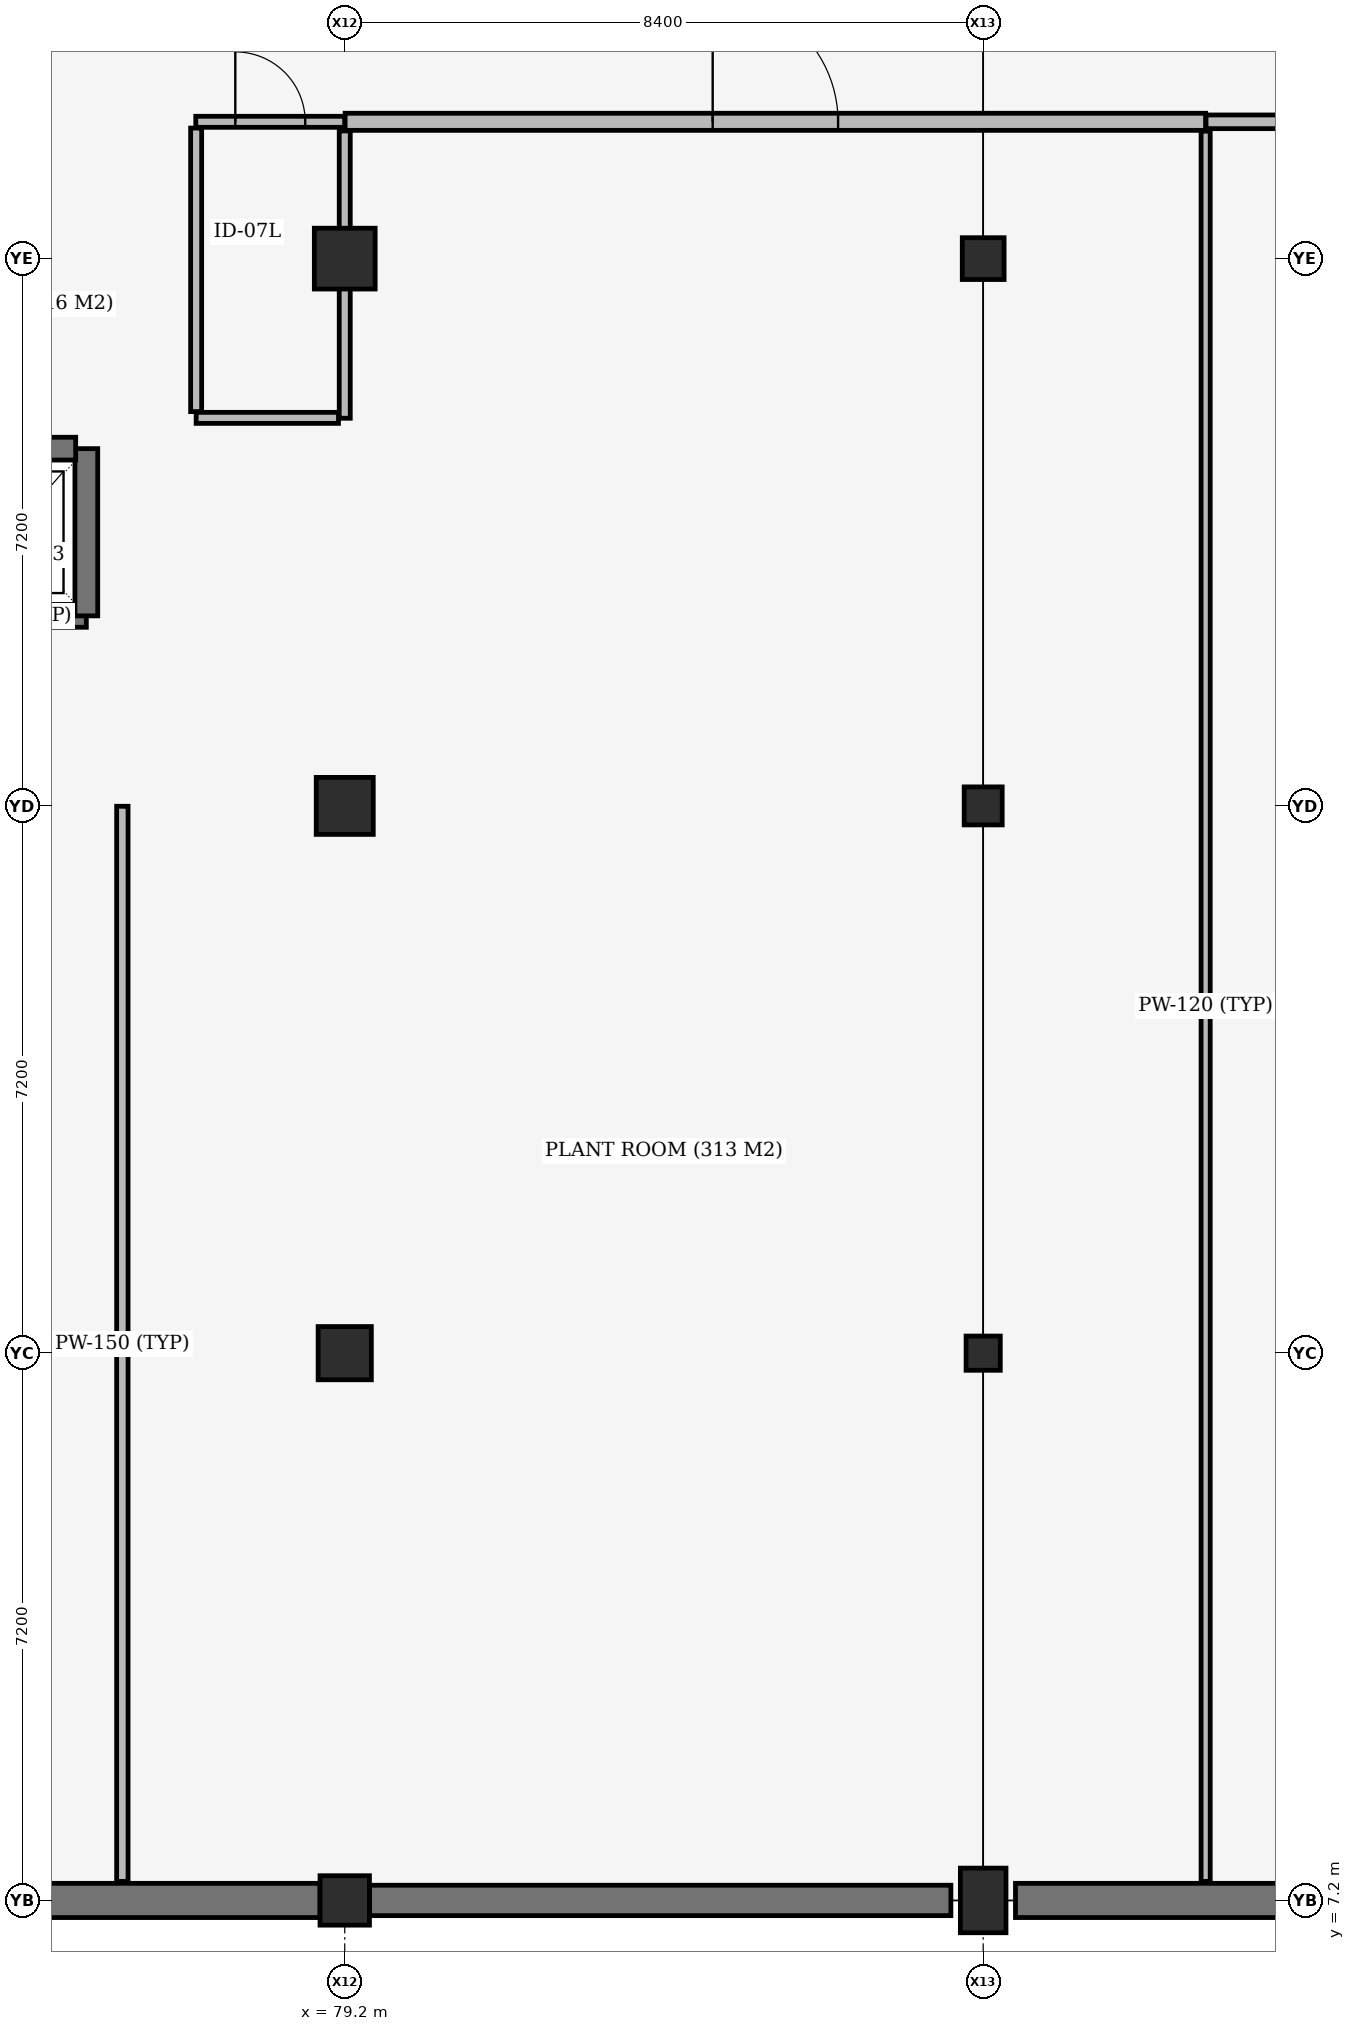
"""IFC4 building model, lengths in metres.
Left out: names, types, materials, properties, quantities, classifications, styles, units other than length and angle.
Written with IfcOpenShell. Run it as: python <this file> out.ifc"""

import sys

from ifc_helpers import new_model, si_unit, direction, frame, frame_2d, origin, origin_2d, place, context, subcontext, project, spatial, rectangle, extrude, element, fill, save


model = new_model("IFC4")
c1 = context("Model", 3, precision=1e-05, world=origin(), true_north=direction((0.0, 1.0)))
c2 = subcontext(c1, "Body", "Model", "MODEL_VIEW")
j1 = project(units=[si_unit("LENGTHUNIT", "METRE"), si_unit("PLANEANGLEUNIT", "RADIAN")], contexts=[c1])
p1 = place(None, origin())
s1 = spatial("IfcSite", under=j1, at=p1, CompositionType="ELEMENT")
p2 = place(p1, origin())
s2 = spatial("IfcBuilding", under=s1, at=p2, CompositionType="ELEMENT")
p3 = place(p2, frame((0.0, 0.0, -4.5)))
s3 = spatial("IfcBuildingStorey", under=s2, at=p3, CompositionType="ELEMENT", Elevation=-4.5)
p4 = place(p3, frame((79.2, 7.2, -0.42), z_axis=(0.0, 0.0, 1.0), x_axis=(1.0, 0.0, 0.0)))
e1 = element("IfcColumn", 1, at=p4, inside=s3, PredefinedType="COLUMN", context=c2, shape_type="SweptSolid", body=[
    extrude(rectangle(XDim=0.65, YDim=0.65, at=origin_2d()), origin(), (0.0, 0.0, 1.0), 4.6),
])
p5 = place(p3, frame((79.2, 14.4, -0.42), z_axis=(0.0, 0.0, 1.0), x_axis=(1.0, 0.0, 0.0)))
e2 = element("IfcColumn", 2, at=p5, inside=s3, PredefinedType="COLUMN", context=c2, shape_type="SweptSolid", body=[
    extrude(rectangle(XDim=0.7, YDim=0.7, at=origin_2d()), origin(), (0.0, 0.0, 1.0), 4.6),
])
p6 = place(p3, frame((79.2, 21.6, -0.42), z_axis=(0.0, 0.0, 1.0), x_axis=(1.0, 0.0, 0.0)))
e3 = element("IfcColumn", 3, at=p6, inside=s3, PredefinedType="COLUMN", context=c2, shape_type="SweptSolid", body=[
    extrude(rectangle(XDim=0.75, YDim=0.75, at=origin_2d()), origin(), (0.0, 0.0, 1.0), 4.6),
])
p7 = place(p3, frame((79.2, 28.8, -0.42), z_axis=(0.0, 0.0, 1.0), x_axis=(1.0, 0.0, 0.0)))
e4 = element("IfcColumn", 4, at=p7, inside=s3, PredefinedType="COLUMN", context=c2, shape_type="SweptSolid", body=[
    extrude(rectangle(XDim=0.8, YDim=0.8, at=origin_2d()), origin(), (0.0, 0.0, 1.0), 4.6),
])
p8 = place(p3, frame((87.6, 7.2, -0.42), z_axis=(0.0, 0.0, 1.0), x_axis=(1.0, 0.0, 0.0)))
e5 = element("IfcColumn", 5, at=p8, inside=s3, PredefinedType="COLUMN", context=c2, shape_type="SweptSolid", body=[
    extrude(rectangle(XDim=0.6, YDim=0.85, at=origin_2d()), origin(), (0.0, 0.0, 1.0), 4.6),
])
p9 = place(p3, frame((87.6, 14.4, -0.42), z_axis=(0.0, 0.0, 1.0), x_axis=(1.0, 0.0, 0.0)))
e6 = element("IfcColumn", 6, at=p9, inside=s3, PredefinedType="COLUMN", context=c2, shape_type="SweptSolid", body=[
    extrude(rectangle(XDim=0.45, YDim=0.45, at=origin_2d()), origin(), (0.0, 0.0, 1.0), 4.6),
])
p10 = place(p3, frame((87.6, 21.6, -0.42), z_axis=(0.0, 0.0, 1.0), x_axis=(1.0, 0.0, 0.0)))
e7 = element("IfcColumn", 7, at=p10, inside=s3, PredefinedType="COLUMN", context=c2, shape_type="SweptSolid", body=[
    extrude(rectangle(XDim=0.5, YDim=0.5, at=origin_2d()), origin(), (0.0, 0.0, 1.0), 4.6),
])
p11 = place(p3, frame((87.6, 28.8, -0.42), z_axis=(0.0, 0.0, 1.0), x_axis=(1.0, 0.0, 0.0)))
e8 = element("IfcColumn", 8, at=p11, inside=s3, PredefinedType="COLUMN", context=c2, shape_type="SweptSolid", body=[
    extrude(rectangle(XDim=0.55, YDim=0.55, at=origin_2d()), origin(), (0.0, 0.0, 1.0), 4.6),
])
p12 = place(p3, frame((73.8, 24.1, 0.0), z_axis=(0.0, 0.0, 1.0), x_axis=(1.0, 0.0, 0.0)))
e9 = element("IfcWall", 9, at=p12, inside=s3, PredefinedType="SHEAR", context=c2, shape_type="SweptSolid", body=[
    extrude(rectangle(XDim=2.0, YDim=0.3, at=frame_2d((1.0, 0.0))), origin(), (0.0, 0.0, 1.0), 4.18),
])
p13 = place(p3, frame((75.8, 24.1, 0.0), z_axis=(0.0, 0.0, 1.0), x_axis=(0.0, 1.0, 0.0)))
e10 = element("IfcWall", 10, at=p13, inside=s3, PredefinedType="SHEAR", context=c2, shape_type="SweptSolid", body=[
    extrude(rectangle(XDim=2.2, YDim=0.3, at=frame_2d((1.1, 0.0))), origin(), (0.0, 0.0, 1.0), 4.18),
])
p14 = place(p3, frame((71.225, 7.2, 0.0), z_axis=(0.0, 0.0, 1.0), x_axis=(1.0, 0.0, 0.0)))
e11 = element("IfcWall", 11, at=p14, inside=s3, PredefinedType="USERDEFINED", context=c2, shape_type="SweptSolid", body=[
    extrude(rectangle(XDim=7.65, YDim=0.45, at=frame_2d((3.825, 0.0))), origin(), (0.0, 0.0, 1.0), 4.18),
])
p15 = place(p3, frame((79.525, 7.2, 0.0), z_axis=(0.0, 0.0, 1.0), x_axis=(1.0, 0.0, 0.0)))
e12 = element("IfcWall", 12, at=p15, inside=s3, PredefinedType="USERDEFINED", context=c2, shape_type="SweptSolid", body=[
    extrude(rectangle(XDim=7.65, YDim=0.4, at=frame_2d((3.825, 0.0))), origin(), (0.0, 0.0, 1.0), 4.18),
])
p16 = place(p3, frame((88.025, 7.2, 0.0), z_axis=(0.0, 0.0, 1.0), x_axis=(1.0, 0.0, 0.0)))
e13 = element("IfcWall", 13, at=p16, inside=s3, PredefinedType="USERDEFINED", context=c2, shape_type="SweptSolid", body=[
    extrude(rectangle(XDim=7.65, YDim=0.45, at=frame_2d((3.825, 0.0))), origin(), (0.0, 0.0, 1.0), 4.18),
])
p17 = place(p3, frame((73.94, 26.3, 0.0), z_axis=(0.0, 0.0, 1.0), x_axis=(1.0, 0.0, 0.0)))
e14 = element("IfcWall", 14, at=p17, inside=s3, PredefinedType="SHEAR", context=c2, shape_type="SweptSolid", body=[
    extrude(rectangle(XDim=1.72, YDim=0.3, at=frame_2d((0.86, 0.0))), origin(), (0.0, 0.0, 1.0), 4.18),
])
p18 = place(p17, frame((0.36, 0.0, 0.0)))
e15 = element("IfcOpeningElement", 15, at=p18, cuts=e14, PredefinedType="OPENING", context=c2, shape_type="SweptSolid", body=[
    extrude(rectangle(XDim=1.0, YDim=2.1, at=frame_2d((0.5, 1.05))), frame((0.0, 0.16, 0.0), z_axis=(0.0, -1.0, 0.0), x_axis=(1.0, 0.0, 0.0)), (0.0, 0.0, 1.0), 0.32),
])
p19 = place(p3, frame((77.24, 30.6, 0.0), z_axis=(0.0, 0.0, 1.0), x_axis=(1.0, 0.0, 0.0)))
e16 = element("IfcWall", 16, at=p19, inside=s3, PredefinedType="PLUMBINGWALL", context=c2, shape_type="SweptSolid", body=[
    extrude(rectangle(XDim=1.96, YDim=0.145, at=frame_2d((0.98, 0.0))), origin(), (0.0, 0.0, 1.0), 3.43),
])
p20 = place(p19, frame((0.52, 0.0, 0.0)))
e17 = element("IfcOpeningElement", 17, at=p20, cuts=e16, PredefinedType="OPENING", context=c2, shape_type="SweptSolid", body=[
    extrude(rectangle(XDim=0.92, YDim=2.1, at=frame_2d((0.46, 1.05))), frame((0.0, 0.083, 0.0), z_axis=(0.0, -1.0, 0.0), x_axis=(1.0, 0.0, 0.0)), (0.0, 0.0, 1.0), 0.165),
])
p21 = place(p3, frame((79.2, 26.7, 0.0), z_axis=(0.0, 0.0, 1.0), x_axis=(0.0, 1.0, 0.0)))
e18 = element("IfcWall", 18, at=p21, inside=s3, PredefinedType="PLUMBINGWALL", context=c2, shape_type="SweptSolid", body=[
    extrude(rectangle(XDim=3.78, YDim=0.145, at=frame_2d((1.89, 0.0))), origin(), (0.0, 0.0, 1.0), 3.43),
])
p22 = place(p3, frame((76.274, 7.45, 0.0), z_axis=(0.0, 0.0, 1.0), x_axis=(0.0, 1.0, 0.0)))
e19 = element("IfcWall", 19, at=p22, inside=s3, PredefinedType="PARTITIONING", context=c2, shape_type="SweptSolid", body=[
    extrude(rectangle(XDim=14.145, YDim=0.15, at=frame_2d((7.073, 0.0))), origin(), (0.0, 0.0, 1.0), 3.43),
])
p23 = place(p3, frame((79.205, 30.6, 0.0), z_axis=(0.0, 0.0, 1.0), x_axis=(1.0, 0.0, 0.0)))
e20 = element("IfcWall", 20, at=p23, inside=s3, PredefinedType="STANDARD", context=c2, shape_type="SweptSolid", body=[
    extrude(rectangle(XDim=11.322, YDim=0.225, at=frame_2d((5.661, 0.0))), origin(), (0.0, 0.0, 1.0), 3.43),
])
p24 = place(p23, frame((4.836, 0.0, 0.0)))
e21 = element("IfcOpeningElement", 21, at=p24, cuts=e20, PredefinedType="OPENING", context=c2, shape_type="SweptSolid", body=[
    extrude(rectangle(XDim=1.65, YDim=2.25, at=frame_2d((0.825, 1.125))), frame((0.0, 0.123, 0.0), z_axis=(0.0, -1.0, 0.0), x_axis=(1.0, 0.0, 0.0)), (0.0, 0.0, 1.0), 0.245),
])
p25 = place(p3, frame((90.527, 7.45, 0.0), z_axis=(0.0, 0.0, 1.0), x_axis=(0.0, 1.0, 0.0)))
e22 = element("IfcWall", 22, at=p25, inside=s3, PredefinedType="PARTITIONING", context=c2, shape_type="SweptSolid", body=[
    extrude(rectangle(XDim=23.028, YDim=0.12, at=frame_2d((11.514, 0.0))), origin(), (0.0, 0.0, 1.0), 3.38),
])
p26 = place(p3, frame((90.532, 30.6, 0.0), z_axis=(0.0, 0.0, 1.0), x_axis=(1.0, 0.0, 0.0)))
e23 = element("IfcWall", 23, at=p26, inside=s3, PredefinedType="PARTITIONING", context=c2, shape_type="SweptSolid", body=[
    extrude(rectangle(XDim=9.893, YDim=0.18, at=frame_2d((4.947, 0.0))), origin(), (0.0, 0.0, 1.0), 3.53),
])
p27 = place(p26, frame((4.471, 0.0, 0.0)))
e24 = element("IfcOpeningElement", 24, at=p27, cuts=e23, PredefinedType="OPENING", context=c2, shape_type="SweptSolid", body=[
    extrude(rectangle(XDim=0.95, YDim=2.15, at=frame_2d((0.475, 1.075))), frame((0.0, 0.1, 0.0), z_axis=(0.0, -1.0, 0.0), x_axis=(1.0, 0.0, 0.0)), (0.0, 0.0, 1.0), 0.2),
])
p28 = place(p3, frame((77.245, 26.705, 0.0), z_axis=(0.0, 0.0, 1.0), x_axis=(1.0, 0.0, 0.0)))
e25 = element("IfcWall", 25, at=p28, inside=s3, PredefinedType="PLUMBINGWALL", context=c2, shape_type="SweptSolid", body=[
    extrude(rectangle(XDim=1.872, YDim=0.145, at=frame_2d((0.936, 0.0))), origin(), (0.0, 0.0, 1.0), 3.48),
])
p29 = place(p3, frame((77.245, 26.788, 0.0), z_axis=(0.0, 0.0, 1.0), x_axis=(0.0, 1.0, 0.0)))
e26 = element("IfcWall", 26, at=p29, inside=s3, PredefinedType="PLUMBINGWALL", context=c2, shape_type="SweptSolid", body=[
    extrude(rectangle(XDim=3.73, YDim=0.145, at=frame_2d((1.865, 0.0))), origin(), (0.0, 0.0, 1.0), 3.48),
])
p30 = place(p20, origin())
e27 = element("IfcDoor", 27, at=p30, inside=s3, OperationType="SINGLE_SWING_LEFT", PredefinedType="DOOR", context=c2, shape_type="SweptSolid", body=[
    extrude(rectangle(XDim=0.92, YDim=2.1, at=frame_2d((0.46, 1.05))), frame((0.0, 0.025, 0.0), z_axis=(0.0, -1.0, 0.0), x_axis=(1.0, 0.0, 0.0)), (0.0, 0.0, 1.0), 0.05),
])
fill(e17, e27)
p31 = place(p24, origin())
e28 = element("IfcDoor", 28, at=p31, inside=s3, OperationType="DOUBLE_DOOR_SINGLE_SWING", PredefinedType="DOOR", context=c2, shape_type="SweptSolid", body=[
    extrude(rectangle(XDim=1.65, YDim=2.25, at=frame_2d((0.825, 1.125))), frame((0.0, 0.025, 0.0), z_axis=(0.0, -1.0, 0.0), x_axis=(1.0, 0.0, 0.0)), (0.0, 0.0, 1.0), 0.05),
])
fill(e21, e28)
save(model, sys.argv[1])
